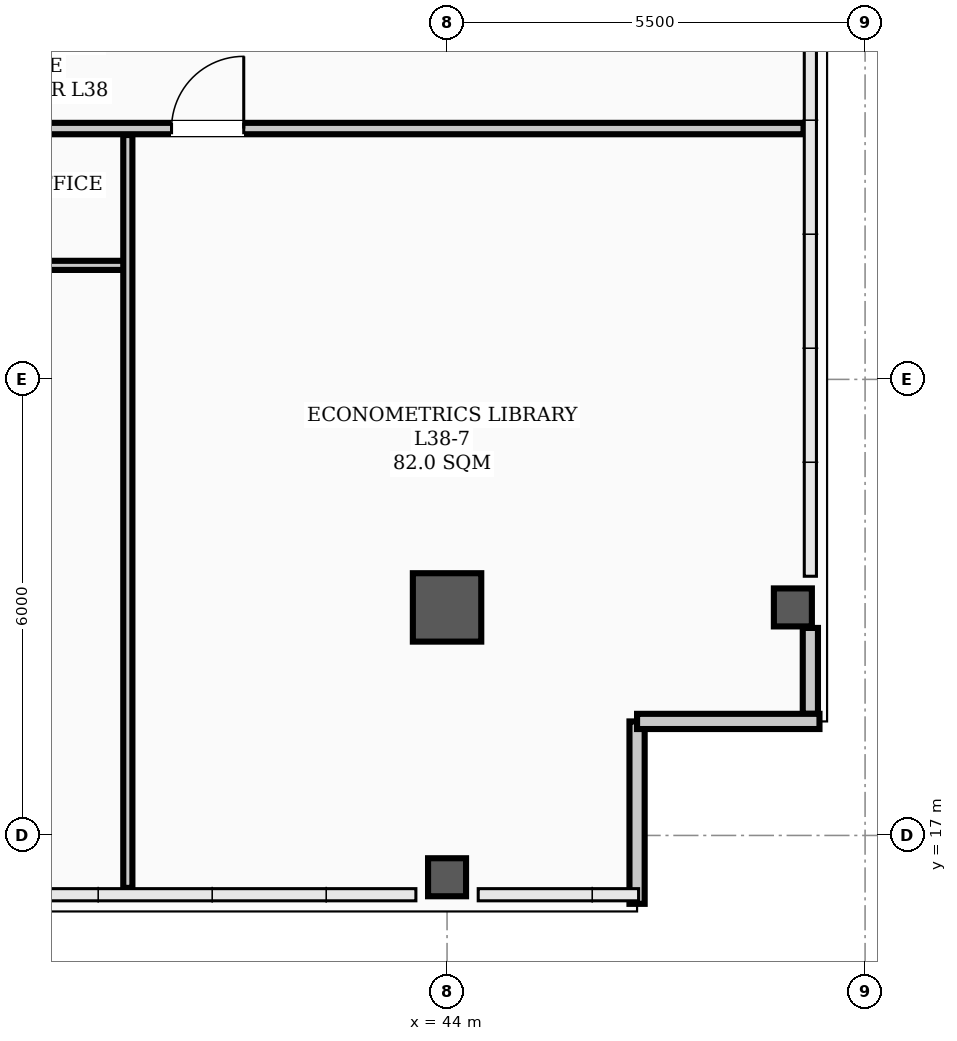
"""IFC4 building model, lengths in metres.
Left out: names, types, materials, properties, quantities, classifications, styles, units other than length and angle.
Written with IfcOpenShell. Run it as: python <this file> out.ifc"""

import sys

from ifc_helpers import new_model, si_unit, direction, frame, frame_2d, origin, origin_2d, place, context, subcontext, project, spatial, rectangle, hollow_rectangle, extrude, element, fill, save


model = new_model("IFC4")
c1 = context("Model", 3, precision=1e-05, world=origin(), true_north=direction((0.0, 1.0)))
c2 = subcontext(c1, "Body", "Model", "MODEL_VIEW")
j1 = project(units=[si_unit("LENGTHUNIT", "METRE"), si_unit("PLANEANGLEUNIT", "RADIAN")], contexts=[c1])
p1 = place(None, origin())
s1 = spatial("IfcSite", under=j1, at=p1, CompositionType="ELEMENT")
p2 = place(p1, origin())
s2 = spatial("IfcBuilding", under=s1, at=p2, CompositionType="ELEMENT")
p3 = place(p2, frame((0.0, 0.0, 153.9)))
s3 = spatial("IfcBuildingStorey", under=s2, at=p3, CompositionType="ELEMENT", Elevation=153.9)
p4 = place(p3, frame((44.0, 20.0, 0.0), z_axis=(0.0, 0.0, 1.0), x_axis=(1.0, 0.0, 0.0)))
e1 = element("IfcColumn", 1, at=p4, inside=s3, PredefinedType="COLUMN", context=c2, shape_type="SweptSolid", body=[
    extrude(hollow_rectangle(XDim=0.9, YDim=0.9, WallThickness=0.035, InnerFilletRadius=0.017, OuterFilletRadius=0.052, at=origin_2d()), origin(), (0.0, 0.0, 1.0), 3.9),
])
for number, where, z_axis, x_axis in (
    (2, (44.0, 16.45, 0.0), (0.0, 0.0, 1.0), (1.0, 0.0, 0.0)),
    (3, (48.55, 20.0, 0.0), (0.0, 0.0, 1.0), (1.0, 0.0, 0.0)),
):
    element("IfcColumn", number, at=place(p3, frame(where, z_axis=z_axis, x_axis=x_axis)), inside=s3, PredefinedType="COLUMN", context=c2, shape_type="SweptSolid", body=[
        extrude(hollow_rectangle(XDim=0.5, YDim=0.5, WallThickness=0.024, InnerFilletRadius=0.012, OuterFilletRadius=0.036, at=origin_2d()), origin(), (0.0, 0.0, 1.0), 3.9),
    ])
p5 = place(p3, frame((48.78, 18.6, 0.0), z_axis=(0.0, 0.0, 1.0), x_axis=(0.0, 1.0, 0.0)))
e4 = element("IfcWall", 4, at=p5, inside=s3, PredefinedType="PARAPET", context=c2, shape_type="SweptSolid", body=[
    extrude(rectangle(XDim=1.13, YDim=0.2, at=frame_2d((0.565, 0.0))), origin(), (0.0, 0.0, 1.0), 1.2),
])
for number, where, z_axis, x_axis in (
    (5, (46.5, 16.1, 0.0), (0.0, 0.0, 1.0), (0.0, 1.0, 0.0)),
    (6, (46.5, 18.5, 0.0), (0.0, 0.0, 1.0), (1.0, 0.0, 0.0)),
):
    element("IfcWall", number, at=place(p3, frame(where, z_axis=z_axis, x_axis=x_axis)), inside=s3, PredefinedType="PARAPET", context=c2, shape_type="SweptSolid", body=[
        extrude(rectangle(XDim=2.4, YDim=0.2, at=frame_2d((1.2, 0.0))), origin(), (0.0, 0.0, 1.0), 1.2),
    ])
p6 = place(p3, frame((2.31, 26.3, 0.0), z_axis=(0.0, 0.0, 1.0), x_axis=(1.0, 0.0, 0.0)))
e7 = element("IfcWall", 7, at=p6, inside=s3, PredefinedType="PARTITIONING", context=c2, shape_type="SweptSolid", body=[
    extrude(rectangle(XDim=46.38, YDim=0.15, at=frame_2d((23.19, 0.0))), origin(), (0.0, 0.0, 1.0), 3.2),
])
p7 = place(p6, frame((9.19, 0.0, 0.0)))
e8 = element("IfcOpeningElement", 8, at=p7, cuts=e7, PredefinedType="OPENING", context=c2, shape_type="SweptSolid", body=[
    extrude(rectangle(XDim=0.95, YDim=2.08, at=frame_2d((0.475, 1.04))), frame((0.0, 0.085, 0.0), z_axis=(0.0, -1.0, 0.0), x_axis=(1.0, 0.0, 0.0)), (0.0, 0.0, 1.0), 0.17),
])
p8 = place(p6, frame((14.815, 0.0, 0.0)))
e9 = element("IfcOpeningElement", 9, at=p8, cuts=e7, PredefinedType="OPENING", context=c2, shape_type="SweptSolid", body=[
    extrude(rectangle(XDim=0.95, YDim=2.08, at=frame_2d((0.475, 1.04))), frame((0.0, 0.085, 0.0), z_axis=(0.0, -1.0, 0.0), x_axis=(1.0, 0.0, 0.0)), (0.0, 0.0, 1.0), 0.17),
])
p9 = place(p6, frame((19.015, 0.0, 0.0)))
e10 = element("IfcOpeningElement", 10, at=p9, cuts=e7, PredefinedType="OPENING", context=c2, shape_type="SweptSolid", body=[
    extrude(rectangle(XDim=0.95, YDim=2.08, at=frame_2d((0.475, 1.04))), frame((0.0, 0.085, 0.0), z_axis=(0.0, -1.0, 0.0), x_axis=(1.0, 0.0, 0.0)), (0.0, 0.0, 1.0), 0.17),
])
p10 = place(p6, frame((26.315, 0.0, 0.0)))
e11 = element("IfcOpeningElement", 11, at=p10, cuts=e7, PredefinedType="OPENING", context=c2, shape_type="SweptSolid", body=[
    extrude(rectangle(XDim=0.95, YDim=2.08, at=frame_2d((0.475, 1.04))), frame((0.0, 0.085, 0.0), z_axis=(0.0, -1.0, 0.0), x_axis=(1.0, 0.0, 0.0)), (0.0, 0.0, 1.0), 0.17),
])
p11 = place(p6, frame((32.915, 0.0, 0.0)))
e12 = element("IfcOpeningElement", 12, at=p11, cuts=e7, PredefinedType="OPENING", context=c2, shape_type="SweptSolid", body=[
    extrude(rectangle(XDim=0.95, YDim=2.08, at=frame_2d((0.475, 1.04))), frame((0.0, 0.085, 0.0), z_axis=(0.0, -1.0, 0.0), x_axis=(1.0, 0.0, 0.0)), (0.0, 0.0, 1.0), 0.17),
])
p12 = place(p6, frame((38.065, 0.0, 0.0)))
e13 = element("IfcOpeningElement", 13, at=p12, cuts=e7, PredefinedType="OPENING", context=c2, shape_type="SweptSolid", body=[
    extrude(rectangle(XDim=0.95, YDim=2.08, at=frame_2d((0.475, 1.04))), frame((0.0, 0.085, 0.0), z_axis=(0.0, -1.0, 0.0), x_axis=(1.0, 0.0, 0.0)), (0.0, 0.0, 1.0), 0.17),
])
p13 = place(p3, frame((33.4, 24.5, 0.0), z_axis=(0.0, 0.0, 1.0), x_axis=(1.0, 0.0, 0.0)))
e14 = element("IfcWall", 14, at=p13, inside=s3, PredefinedType="PARTITIONING", context=c2, shape_type="SweptSolid", body=[
    extrude(rectangle(XDim=6.4, YDim=0.12, at=frame_2d((3.2, 0.0))), origin(), (0.0, 0.0, 1.0), 3.2),
])
p14 = place(p13, frame((1.825, 0.0, 0.0)))
e15 = element("IfcOpeningElement", 15, at=p14, cuts=e14, PredefinedType="OPENING", context=c2, shape_type="SweptSolid", body=[
    extrude(rectangle(XDim=0.95, YDim=2.08, at=frame_2d((0.475, 1.04))), frame((0.0, 0.07, 0.0), z_axis=(0.0, -1.0, 0.0), x_axis=(1.0, 0.0, 0.0)), (0.0, 0.0, 1.0), 0.14),
])
p15 = place(p3, frame((39.8, 16.31, 0.0), z_axis=(0.0, 0.0, 1.0), x_axis=(0.0, 1.0, 0.0)))
e16 = element("IfcWall", 16, at=p15, inside=s3, PredefinedType="PARTITIONING", context=c2, shape_type="SweptSolid", body=[
    extrude(rectangle(XDim=9.905, YDim=0.12, at=frame_2d((4.953, 0.0))), origin(), (0.0, 0.0, 1.0), 3.1),
])
p16 = place(p12, origin())
e17 = element("IfcDoor", 17, at=p16, inside=s3, OperationType="SINGLE_SWING_RIGHT", PredefinedType="DOOR", context=c2, shape_type="SweptSolid", body=[
    extrude(rectangle(XDim=0.95, YDim=2.08, at=frame_2d((0.475, 1.04))), frame((0.0, 0.025, 0.0), z_axis=(0.0, -1.0, 0.0), x_axis=(1.0, 0.0, 0.0)), (0.0, 0.0, 1.0), 0.05),
])
fill(e13, e17)
save(model, sys.argv[1])
